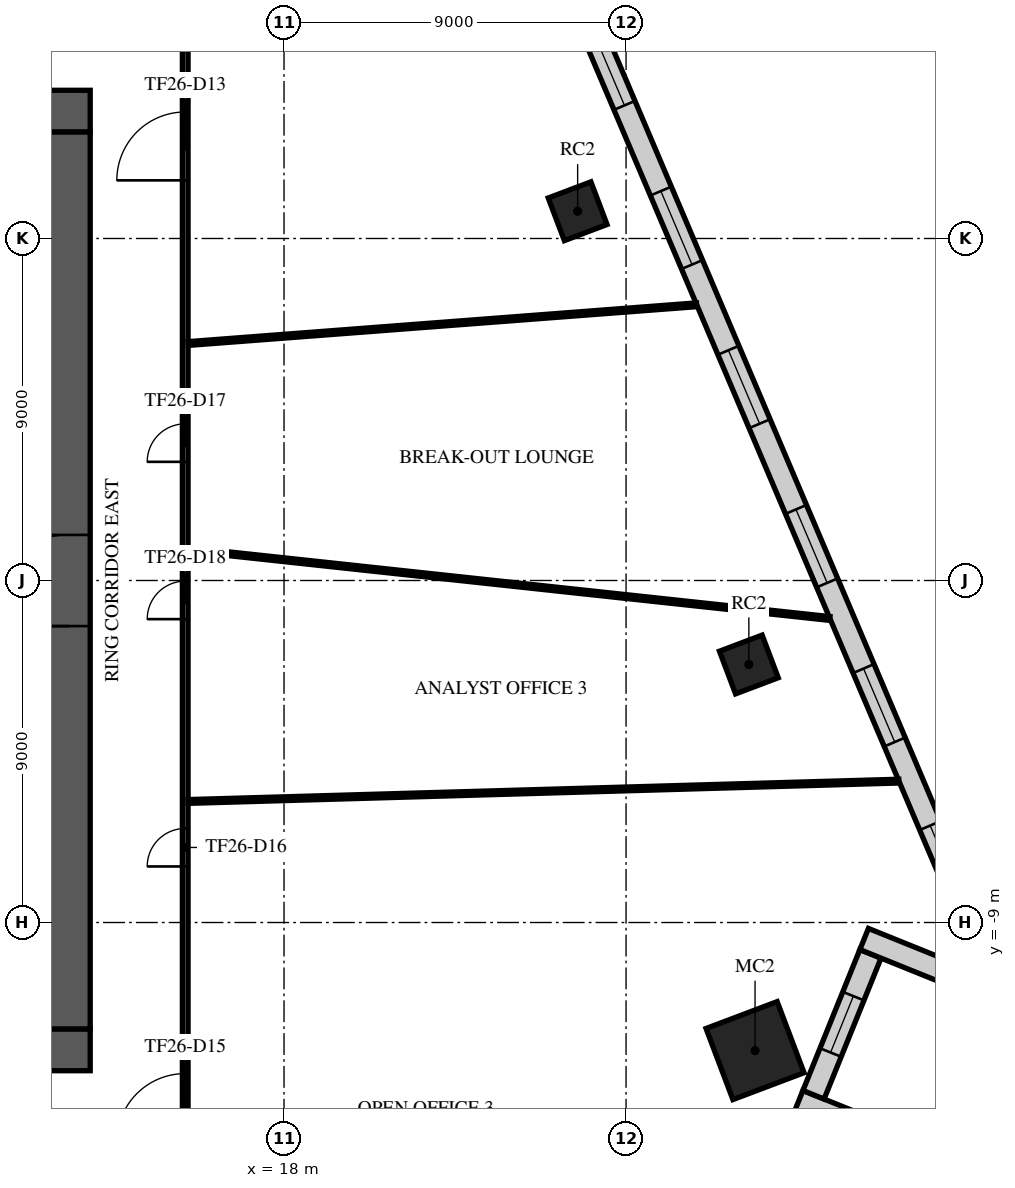
"""IFC4 building model, lengths in metres.
Left out: names, types, materials, properties, quantities, classifications, styles, units other than length and angle.
Written with IfcOpenShell. Run it as: python <this file> out.ifc"""

import sys

from ifc_helpers import new_model, si_unit, direction, frame, frame_2d, origin, origin_2d, place, context, subcontext, project, spatial, rectangle, extrude, element, fill, save


model = new_model("IFC4")
c1 = context("Model", 3, precision=1e-05, world=origin(), true_north=direction((0.0, 1.0)))
c2 = subcontext(c1, "Body", "Model", "MODEL_VIEW")
j1 = project(units=[si_unit("LENGTHUNIT", "METRE"), si_unit("PLANEANGLEUNIT", "RADIAN")], contexts=[c1])
p1 = place(None, origin())
s1 = spatial("IfcSite", under=j1, at=p1, CompositionType="ELEMENT")
p2 = place(p1, origin())
s2 = spatial("IfcBuilding", under=s1, at=p2, CompositionType="ELEMENT")
p3 = place(p2, frame((0.0, 0.0, 114.1)))
s3 = spatial("IfcBuildingStorey", under=s2, at=p3, CompositionType="ELEMENT", Elevation=114.1)
p4 = place(p3, frame((30.394, -12.371, 0.0), z_axis=(0.0, 0.0, 1.0), x_axis=(0.935491525991, 0.353349125935, 0.0)))
e1 = element("IfcColumn", 1, at=p4, inside=s3, PredefinedType="COLUMN", context=c2, shape_type="SweptSolid", body=[
    extrude(rectangle(XDim=2.0, YDim=2.0, at=origin_2d()), origin(), (0.0, 0.0, 1.0), 4.0),
])
for number, where, z_axis, x_axis in (
    (2, (30.231, -2.21, 0.0), (0.0, 0.0, 1.0), (0.935, 0.353, 0.0)),
    (3, (25.726, 9.717, 0.0), (0.0, 0.0, 1.0), (0.935, 0.353, 0.0)),
):
    element("IfcColumn", number, at=place(p3, frame(where, z_axis=z_axis, x_axis=x_axis)), inside=s3, PredefinedType="COLUMN", context=c2, shape_type="SweptSolid", body=[
        extrude(rectangle(XDim=1.2, YDim=1.2, at=origin_2d()), origin(), (0.0, 0.0, 1.0), 4.0),
    ])
p5 = place(p3, frame((-12.9, 12.35, 0.0), z_axis=(0.0, 0.0, 1.0), x_axis=(1.0, 0.0, 0.0)))
e4 = element("IfcWall", 4, at=p5, inside=s3, PredefinedType="SHEAR", context=c2, shape_type="SweptSolid", body=[
    extrude(rectangle(XDim=25.8, YDim=1.1, at=frame_2d((12.9, 0.0))), origin(), (0.0, 0.0, 1.0), 3.58),
])
p6 = place(p5, frame((11.7, 0.0, 0.0)))
e5 = element("IfcOpeningElement", 5, at=p6, cuts=e4, PredefinedType="OPENING", context=c2, shape_type="SweptSolid", body=[
    extrude(rectangle(XDim=2.4, YDim=2.4, at=frame_2d((1.2, 1.2))), frame((0.0, 0.56, 0.0), z_axis=(0.0, -1.0, 0.0), x_axis=(1.0, 0.0, 0.0)), (0.0, 0.0, 1.0), 1.12),
])
p7 = place(p5, frame((22.525, 0.0, 0.0)))
e6 = element("IfcOpeningElement", 6, at=p7, cuts=e4, PredefinedType="OPENING", context=c2, shape_type="SweptSolid", body=[
    extrude(rectangle(XDim=1.2, YDim=2.1, at=frame_2d((0.6, 1.05))), frame((0.0, 0.56, 0.0), z_axis=(0.0, -1.0, 0.0), x_axis=(1.0, 0.0, 0.0)), (0.0, 0.0, 1.0), 1.12),
])
p8 = place(p5, frame((1.5, 0.0, 0.0)))
e7 = element("IfcOpeningElement", 7, at=p8, cuts=e4, PredefinedType="OPENING", context=c2, shape_type="SweptSolid", body=[
    extrude(rectangle(XDim=1.0, YDim=2.1, at=frame_2d((0.5, 1.05))), frame((0.0, 0.56, 0.0), z_axis=(0.0, -1.0, 0.0), x_axis=(1.0, 0.0, 0.0)), (0.0, 0.0, 1.0), 1.12),
])
p9 = place(p3, frame((-12.9, -12.35, 0.0), z_axis=(0.0, 0.0, 1.0), x_axis=(1.0, 0.0, 0.0)))
e8 = element("IfcWall", 8, at=p9, inside=s3, PredefinedType="SHEAR", context=c2, shape_type="SweptSolid", body=[
    extrude(rectangle(XDim=25.8, YDim=1.1, at=frame_2d((12.9, 0.0))), origin(), (0.0, 0.0, 1.0), 3.58),
])
p10 = place(p9, frame((7.8, 0.0, 0.0)))
e9 = element("IfcOpeningElement", 9, at=p10, cuts=e8, PredefinedType="OPENING", context=c2, shape_type="SweptSolid", body=[
    extrude(rectangle(XDim=2.0, YDim=2.1, at=frame_2d((1.0, 1.05))), frame((0.0, 0.56, 0.0), z_axis=(0.0, -1.0, 0.0), x_axis=(1.0, 0.0, 0.0)), (0.0, 0.0, 1.0), 1.12),
])
p11 = place(p9, frame((17.925, 0.0, 0.0)))
e10 = element("IfcOpeningElement", 10, at=p11, cuts=e8, PredefinedType="OPENING", context=c2, shape_type="SweptSolid", body=[
    extrude(rectangle(XDim=1.2, YDim=2.1, at=frame_2d((0.6, 1.05))), frame((0.0, 0.56, 0.0), z_axis=(0.0, -1.0, 0.0), x_axis=(1.0, 0.0, 0.0)), (0.0, 0.0, 1.0), 1.12),
])
p12 = place(p9, frame((2.075, 0.0, 0.0)))
e11 = element("IfcOpeningElement", 11, at=p12, cuts=e8, PredefinedType="OPENING", context=c2, shape_type="SweptSolid", body=[
    extrude(rectangle(XDim=1.2, YDim=2.1, at=frame_2d((0.6, 1.05))), frame((0.0, 0.56, 0.0), z_axis=(0.0, -1.0, 0.0), x_axis=(1.0, 0.0, 0.0)), (0.0, 0.0, 1.0), 1.12),
])
p13 = place(p9, frame((22.525, 0.0, 0.0)))
e12 = element("IfcOpeningElement", 12, at=p13, cuts=e8, PredefinedType="OPENING", context=c2, shape_type="SweptSolid", body=[
    extrude(rectangle(XDim=1.2, YDim=2.1, at=frame_2d((0.6, 1.05))), frame((0.0, 0.56, 0.0), z_axis=(0.0, -1.0, 0.0), x_axis=(1.0, 0.0, 0.0)), (0.0, 0.0, 1.0), 1.12),
])
p14 = place(p3, frame((12.35, -11.8, 0.0), z_axis=(0.0, 0.0, 1.0), x_axis=(0.0, 1.0, 0.0)))
e13 = element("IfcWall", 13, at=p14, inside=s3, PredefinedType="SHEAR", context=c2, shape_type="SweptSolid", body=[
    extrude(rectangle(XDim=23.6, YDim=1.1, at=frame_2d((11.8, 0.0))), origin(), (0.0, 0.0, 1.0), 3.58),
])
p15 = place(p14, frame((10.6, 0.0, 0.0)))
e14 = element("IfcOpeningElement", 14, at=p15, cuts=e13, PredefinedType="OPENING", context=c2, shape_type="SweptSolid", body=[
    extrude(rectangle(XDim=2.4, YDim=2.4, at=frame_2d((1.2, 1.2))), frame((0.0, 0.56, 0.0), z_axis=(0.0, -1.0, 0.0), x_axis=(1.0, 0.0, 0.0)), (0.0, 0.0, 1.0), 1.12),
])
p16 = place(p3, frame((33.86, -14.635, 0.0), z_axis=(0.0, 0.0, 1.0), x_axis=(-0.927177918056, 0.374621286461, 0.0)))
e15 = element("IfcWall", 15, at=p16, inside=s3, PredefinedType="STANDARD", context=c2, shape_type="SweptSolid", body=[
    extrude(rectangle(XDim=2.5, YDim=0.6, at=frame_2d((1.25, 0.0))), origin(), (0.0, 0.0, 1.0), 3.58),
])
p17 = place(p3, frame((31.932, -13.533, 0.0), z_axis=(0.0, 0.0, 1.0), x_axis=(0.374629554127, 0.927174577507, 0.0)))
e16 = element("IfcWall", 16, at=p17, inside=s3, PredefinedType="STANDARD", context=c2, shape_type="SweptSolid", body=[
    extrude(rectangle(XDim=4.0, YDim=0.6, at=frame_2d((2.0, 0.0))), origin(), (0.0, 0.0, 1.0), 3.58),
])
p18 = place(p17, frame((1.2, 0.0, 0.9)))
e17 = element("IfcOpeningElement", 17, at=p18, cuts=e16, PredefinedType="OPENING", context=c2, shape_type="SweptSolid", body=[
    extrude(rectangle(XDim=1.6, YDim=2.1, at=frame_2d((0.8, 1.05))), frame((0.0, 0.31, 0.0), z_axis=(0.0, -1.0, 0.0), x_axis=(1.0, 0.0, 0.0)), (0.0, 0.0, 1.0), 0.62),
])
p19 = place(p3, frame((33.265, -9.434, 0.0), z_axis=(0.0, 0.0, 1.0), x_axis=(0.927177918056, -0.374621286461, 0.0)))
e18 = element("IfcWall", 18, at=p19, inside=s3, PredefinedType="STANDARD", context=c2, shape_type="SweptSolid", body=[
    extrude(rectangle(XDim=2.5, YDim=0.6, at=frame_2d((1.25, 0.0))), origin(), (0.0, 0.0, 1.0), 3.58),
])
p20 = place(p3, frame((36.277, -9.452, 0.0), z_axis=(0.0, 0.0, 1.0), x_axis=(-0.390731814816, 0.920504562124, 0.0)))
e19 = element("IfcWall", 19, at=p20, inside=s3, PredefinedType="STANDARD", context=c2, shape_type="SweptSolid", body=[
    extrude(rectangle(XDim=45.376, YDim=0.6, at=frame_2d((22.688, 0.0))), origin(), (0.0, 0.0, 1.0), 3.58),
])
p21 = place(p20, frame((1.163, 0.0, 0.9)))
e20 = element("IfcOpeningElement", 20, at=p21, cuts=e19, PredefinedType="OPENING", context=c2, shape_type="SweptSolid", body=[
    extrude(rectangle(XDim=2.1, YDim=2.1, at=frame_2d((1.05, 1.05))), frame((0.0, 0.31, 0.0), z_axis=(0.0, -1.0, 0.0), x_axis=(1.0, 0.0, 0.0)), (0.0, 0.0, 1.0), 0.62),
])
p22 = place(p20, frame((5.651, 0.0, 0.9)))
e21 = element("IfcOpeningElement", 21, at=p22, cuts=e19, PredefinedType="OPENING", context=c2, shape_type="SweptSolid", body=[
    extrude(rectangle(XDim=2.1, YDim=2.1, at=frame_2d((1.05, 1.05))), frame((0.0, 0.31, 0.0), z_axis=(0.0, -1.0, 0.0), x_axis=(1.0, 0.0, 0.0)), (0.0, 0.0, 1.0), 0.62),
])
p23 = place(p20, frame((10.201, 0.0, 0.9)))
e22 = element("IfcOpeningElement", 22, at=p23, cuts=e19, PredefinedType="OPENING", context=c2, shape_type="SweptSolid", body=[
    extrude(rectangle(XDim=2.1, YDim=2.1, at=frame_2d((1.05, 1.05))), frame((0.0, 0.31, 0.0), z_axis=(0.0, -1.0, 0.0), x_axis=(1.0, 0.0, 0.0)), (0.0, 0.0, 1.0), 0.62),
])
p24 = place(p20, frame((14.751, 0.0, 0.9)))
e23 = element("IfcOpeningElement", 23, at=p24, cuts=e19, PredefinedType="OPENING", context=c2, shape_type="SweptSolid", body=[
    extrude(rectangle(XDim=2.1, YDim=2.1, at=frame_2d((1.05, 1.05))), frame((0.0, 0.31, 0.0), z_axis=(0.0, -1.0, 0.0), x_axis=(1.0, 0.0, 0.0)), (0.0, 0.0, 1.0), 0.62),
])
p25 = place(p20, frame((19.301, 0.0, 0.9)))
e24 = element("IfcOpeningElement", 24, at=p25, cuts=e19, PredefinedType="OPENING", context=c2, shape_type="SweptSolid", body=[
    extrude(rectangle(XDim=2.1, YDim=2.1, at=frame_2d((1.05, 1.05))), frame((0.0, 0.31, 0.0), z_axis=(0.0, -1.0, 0.0), x_axis=(1.0, 0.0, 0.0)), (0.0, 0.0, 1.0), 0.62),
])
p26 = place(p20, frame((23.851, 0.0, 0.9)))
e25 = element("IfcOpeningElement", 25, at=p26, cuts=e19, PredefinedType="OPENING", context=c2, shape_type="SweptSolid", body=[
    extrude(rectangle(XDim=2.1, YDim=2.1, at=frame_2d((1.05, 1.05))), frame((0.0, 0.31, 0.0), z_axis=(0.0, -1.0, 0.0), x_axis=(1.0, 0.0, 0.0)), (0.0, 0.0, 1.0), 0.62),
])
p27 = place(p20, frame((28.401, 0.0, 0.9)))
e26 = element("IfcOpeningElement", 26, at=p27, cuts=e19, PredefinedType="OPENING", context=c2, shape_type="SweptSolid", body=[
    extrude(rectangle(XDim=2.1, YDim=2.1, at=frame_2d((1.05, 1.05))), frame((0.0, 0.31, 0.0), z_axis=(0.0, -1.0, 0.0), x_axis=(1.0, 0.0, 0.0)), (0.0, 0.0, 1.0), 0.62),
])
p28 = place(p20, frame((32.951, 0.0, 0.9)))
e27 = element("IfcOpeningElement", 27, at=p28, cuts=e19, PredefinedType="OPENING", context=c2, shape_type="SweptSolid", body=[
    extrude(rectangle(XDim=2.1, YDim=2.1, at=frame_2d((1.05, 1.05))), frame((0.0, 0.31, 0.0), z_axis=(0.0, -1.0, 0.0), x_axis=(1.0, 0.0, 0.0)), (0.0, 0.0, 1.0), 0.62),
])
p29 = place(p20, frame((37.501, 0.0, 0.9)))
e28 = element("IfcOpeningElement", 28, at=p29, cuts=e19, PredefinedType="OPENING", context=c2, shape_type="SweptSolid", body=[
    extrude(rectangle(XDim=2.1, YDim=2.1, at=frame_2d((1.05, 1.05))), frame((0.0, 0.31, 0.0), z_axis=(0.0, -1.0, 0.0), x_axis=(1.0, 0.0, 0.0)), (0.0, 0.0, 1.0), 0.62),
])
p30 = place(p20, frame((42.051, 0.0, 0.9)))
e29 = element("IfcOpeningElement", 29, at=p30, cuts=e19, PredefinedType="OPENING", context=c2, shape_type="SweptSolid", body=[
    extrude(rectangle(XDim=2.1, YDim=2.1, at=frame_2d((1.05, 1.05))), frame((0.0, 0.31, 0.0), z_axis=(0.0, -1.0, 0.0), x_axis=(1.0, 0.0, 0.0)), (0.0, 0.0, 1.0), 0.62),
])
p31 = place(p3, frame((15.4, -15.325, 0.0), z_axis=(0.0, 0.0, 1.0), x_axis=(0.0, 1.0, 0.0)))
e30 = element("IfcWall", 30, at=p31, inside=s3, PredefinedType="PARTITIONING", context=c2, shape_type="SweptSolid", body=[
    extrude(rectangle(XDim=30.65, YDim=0.15, at=frame_2d((15.325, 0.0))), origin(), (0.0, 0.0, 1.0), 3.08),
])
p32 = place(p31, frame((25.855, 0.0, 0.0)))
e31 = element("IfcOpeningElement", 31, at=p32, cuts=e30, PredefinedType="OPENING", context=c2, shape_type="SweptSolid", body=[
    extrude(rectangle(XDim=1.8, YDim=2.1, at=frame_2d((0.9, 1.05))), frame((0.0, 0.085, 0.0), z_axis=(0.0, -1.0, 0.0), x_axis=(1.0, 0.0, 0.0)), (0.0, 0.0, 1.0), 0.17),
])
p33 = place(p31, frame((0.55, 0.0, 0.0)))
e32 = element("IfcOpeningElement", 32, at=p33, cuts=e30, PredefinedType="OPENING", context=c2, shape_type="SweptSolid", body=[
    extrude(rectangle(XDim=1.8, YDim=2.1, at=frame_2d((0.9, 1.05))), frame((0.0, 0.085, 0.0), z_axis=(0.0, -1.0, 0.0), x_axis=(1.0, 0.0, 0.0)), (0.0, 0.0, 1.0), 0.17),
])
p34 = place(p31, frame((7.8, 0.0, 0.0)))
e33 = element("IfcOpeningElement", 33, at=p34, cuts=e30, PredefinedType="OPENING", context=c2, shape_type="SweptSolid", body=[
    extrude(rectangle(XDim=1.0, YDim=2.1, at=frame_2d((0.5, 1.05))), frame((0.0, 0.085, 0.0), z_axis=(0.0, -1.0, 0.0), x_axis=(1.0, 0.0, 0.0)), (0.0, 0.0, 1.0), 0.17),
])
p35 = place(p31, frame((18.448, 0.0, 0.0)))
e34 = element("IfcOpeningElement", 34, at=p35, cuts=e30, PredefinedType="OPENING", context=c2, shape_type="SweptSolid", body=[
    extrude(rectangle(XDim=1.0, YDim=2.1, at=frame_2d((0.5, 1.05))), frame((0.0, 0.085, 0.0), z_axis=(0.0, -1.0, 0.0), x_axis=(1.0, 0.0, 0.0)), (0.0, 0.0, 1.0), 0.17),
])
p36 = place(p31, frame((14.308, 0.0, 0.0)))
e35 = element("IfcOpeningElement", 35, at=p36, cuts=e30, PredefinedType="OPENING", context=c2, shape_type="SweptSolid", body=[
    extrude(rectangle(XDim=1.0, YDim=2.1, at=frame_2d((0.5, 1.05))), frame((0.0, 0.085, 0.0), z_axis=(0.0, -1.0, 0.0), x_axis=(1.0, 0.0, 0.0)), (0.0, 0.0, 1.0), 0.17),
])
p37 = place(p3, frame((15.476, -5.815, 0.0), z_axis=(0.0, 0.0, 1.0), x_axis=(0.99959082954, 0.028603732257, 0.0)))
e36 = element("IfcWall", 36, at=p37, inside=s3, PredefinedType="PARTITIONING", context=c2, shape_type="SweptSolid", body=[
    extrude(rectangle(XDim=18.709, YDim=0.1, at=frame_2d((9.354, 0.0))), origin(), (0.0, 0.0, 1.0), 2.83),
])
p38 = place(p3, frame((15.48, 0.818, 0.0), z_axis=(0.0, 0.0, 1.0), x_axis=(0.994248502276, -0.107097692424, 0.0)))
e37 = element("IfcWall", 37, at=p38, inside=s3, PredefinedType="PARTITIONING", context=c2, shape_type="SweptSolid", body=[
    extrude(rectangle(XDim=16.979, YDim=0.1, at=frame_2d((8.489, 0.0))), origin(), (0.0, 0.0, 1.0), 2.83),
])
p39 = place(p3, frame((15.479, 6.236, 0.0), z_axis=(0.0, 0.0, 1.0), x_axis=(0.997108716133, 0.075988211007, 0.0)))
e38 = element("IfcWall", 38, at=p39, inside=s3, PredefinedType="PARTITIONING", context=c2, shape_type="SweptSolid", body=[
    extrude(rectangle(XDim=13.417, YDim=0.1, at=frame_2d((6.708, 0.0))), origin(), (0.0, 0.0, 1.0), 2.83),
])
p40 = place(p15, origin())
e39 = element("IfcDoor", 39, at=p40, inside=s3, OperationType="SINGLE_SWING_LEFT", PredefinedType="DOOR", context=c2, shape_type="SweptSolid", body=[
    extrude(rectangle(XDim=2.4, YDim=2.4, at=frame_2d((1.2, 1.2))), frame((0.0, 0.025, 0.0), z_axis=(0.0, -1.0, 0.0), x_axis=(1.0, 0.0, 0.0)), (0.0, 0.0, 1.0), 0.05),
])
fill(e14, e39)
p41 = place(p18, origin())
e40 = element("IfcWindow", 40, at=p41, inside=s3, PartitioningType="SINGLE_PANEL", PredefinedType="WINDOW", context=c2, shape_type="SweptSolid", body=[
    extrude(rectangle(XDim=1.6, YDim=2.1, at=frame_2d((0.8, 1.05))), frame((0.0, 0.03, 0.0), z_axis=(0.0, -1.0, 0.0), x_axis=(1.0, 0.0, 0.0)), (0.0, 0.0, 1.0), 0.06),
])
fill(e17, e40)
p42 = place(p21, origin())
e41 = element("IfcWindow", 41, at=p42, inside=s3, PartitioningType="SINGLE_PANEL", PredefinedType="WINDOW", context=c2, shape_type="SweptSolid", body=[
    extrude(rectangle(XDim=2.1, YDim=2.1, at=frame_2d((1.05, 1.05))), frame((0.0, 0.03, 0.0), z_axis=(0.0, -1.0, 0.0), x_axis=(1.0, 0.0, 0.0)), (0.0, 0.0, 1.0), 0.06),
])
fill(e20, e41)
p43 = place(p22, origin())
e42 = element("IfcWindow", 42, at=p43, inside=s3, PartitioningType="SINGLE_PANEL", PredefinedType="WINDOW", context=c2, shape_type="SweptSolid", body=[
    extrude(rectangle(XDim=2.1, YDim=2.1, at=frame_2d((1.05, 1.05))), frame((0.0, 0.03, 0.0), z_axis=(0.0, -1.0, 0.0), x_axis=(1.0, 0.0, 0.0)), (0.0, 0.0, 1.0), 0.06),
])
fill(e21, e42)
p44 = place(p23, origin())
e43 = element("IfcWindow", 43, at=p44, inside=s3, PartitioningType="SINGLE_PANEL", PredefinedType="WINDOW", context=c2, shape_type="SweptSolid", body=[
    extrude(rectangle(XDim=2.1, YDim=2.1, at=frame_2d((1.05, 1.05))), frame((0.0, 0.03, 0.0), z_axis=(0.0, -1.0, 0.0), x_axis=(1.0, 0.0, 0.0)), (0.0, 0.0, 1.0), 0.06),
])
fill(e22, e43)
p45 = place(p24, origin())
e44 = element("IfcWindow", 44, at=p45, inside=s3, PartitioningType="SINGLE_PANEL", PredefinedType="WINDOW", context=c2, shape_type="SweptSolid", body=[
    extrude(rectangle(XDim=2.1, YDim=2.1, at=frame_2d((1.05, 1.05))), frame((0.0, 0.03, 0.0), z_axis=(0.0, -1.0, 0.0), x_axis=(1.0, 0.0, 0.0)), (0.0, 0.0, 1.0), 0.06),
])
fill(e23, e44)
p46 = place(p25, origin())
e45 = element("IfcWindow", 45, at=p46, inside=s3, PartitioningType="SINGLE_PANEL", PredefinedType="WINDOW", context=c2, shape_type="SweptSolid", body=[
    extrude(rectangle(XDim=2.1, YDim=2.1, at=frame_2d((1.05, 1.05))), frame((0.0, 0.03, 0.0), z_axis=(0.0, -1.0, 0.0), x_axis=(1.0, 0.0, 0.0)), (0.0, 0.0, 1.0), 0.06),
])
fill(e24, e45)
p47 = place(p26, origin())
e46 = element("IfcWindow", 46, at=p47, inside=s3, PartitioningType="SINGLE_PANEL", PredefinedType="WINDOW", context=c2, shape_type="SweptSolid", body=[
    extrude(rectangle(XDim=2.1, YDim=2.1, at=frame_2d((1.05, 1.05))), frame((0.0, 0.03, 0.0), z_axis=(0.0, -1.0, 0.0), x_axis=(1.0, 0.0, 0.0)), (0.0, 0.0, 1.0), 0.06),
])
fill(e25, e46)
p48 = place(p32, frame((1.8, 0.0, 0.0), z_axis=(0.0, 0.0, 1.0), x_axis=(-1.0, 0.0, 0.0)))
e47 = element("IfcDoor", 47, at=p48, inside=s3, OperationType="DOUBLE_DOOR_SINGLE_SWING", PredefinedType="DOOR", context=c2, shape_type="SweptSolid", body=[
    extrude(rectangle(XDim=1.8, YDim=2.1, at=frame_2d((0.9, 1.05))), frame((0.0, 0.025, 0.0), z_axis=(0.0, -1.0, 0.0), x_axis=(1.0, 0.0, 0.0)), (0.0, 0.0, 1.0), 0.05),
])
fill(e31, e47)
p49 = place(p33, frame((1.8, 0.0, 0.0), z_axis=(0.0, 0.0, 1.0), x_axis=(-1.0, 0.0, 0.0)))
e48 = element("IfcDoor", 48, at=p49, inside=s3, OperationType="DOUBLE_DOOR_SINGLE_SWING", PredefinedType="DOOR", context=c2, shape_type="SweptSolid", body=[
    extrude(rectangle(XDim=1.8, YDim=2.1, at=frame_2d((0.9, 1.05))), frame((0.0, 0.025, 0.0), z_axis=(0.0, -1.0, 0.0), x_axis=(1.0, 0.0, 0.0)), (0.0, 0.0, 1.0), 0.05),
])
fill(e32, e48)
p50 = place(p34, frame((1.0, 0.0, 0.0), z_axis=(0.0, 0.0, 1.0), x_axis=(-1.0, 0.0, 0.0)))
e49 = element("IfcDoor", 49, at=p50, inside=s3, OperationType="SINGLE_SWING_RIGHT", PredefinedType="DOOR", context=c2, shape_type="SweptSolid", body=[
    extrude(rectangle(XDim=1.0, YDim=2.1, at=frame_2d((0.5, 1.05))), frame((0.0, 0.025, 0.0), z_axis=(0.0, -1.0, 0.0), x_axis=(1.0, 0.0, 0.0)), (0.0, 0.0, 1.0), 0.05),
])
fill(e33, e49)
p51 = place(p35, frame((1.0, 0.0, 0.0), z_axis=(0.0, 0.0, 1.0), x_axis=(-1.0, 0.0, 0.0)))
e50 = element("IfcDoor", 50, at=p51, inside=s3, OperationType="SINGLE_SWING_RIGHT", PredefinedType="DOOR", context=c2, shape_type="SweptSolid", body=[
    extrude(rectangle(XDim=1.0, YDim=2.1, at=frame_2d((0.5, 1.05))), frame((0.0, 0.025, 0.0), z_axis=(0.0, -1.0, 0.0), x_axis=(1.0, 0.0, 0.0)), (0.0, 0.0, 1.0), 0.05),
])
fill(e34, e50)
p52 = place(p36, frame((1.0, 0.0, 0.0), z_axis=(0.0, 0.0, 1.0), x_axis=(-1.0, 0.0, 0.0)))
e51 = element("IfcDoor", 51, at=p52, inside=s3, OperationType="SINGLE_SWING_LEFT", PredefinedType="DOOR", context=c2, shape_type="SweptSolid", body=[
    extrude(rectangle(XDim=1.0, YDim=2.1, at=frame_2d((0.5, 1.05))), frame((0.0, 0.025, 0.0), z_axis=(0.0, -1.0, 0.0), x_axis=(1.0, 0.0, 0.0)), (0.0, 0.0, 1.0), 0.05),
])
fill(e35, e51)
save(model, sys.argv[1])
